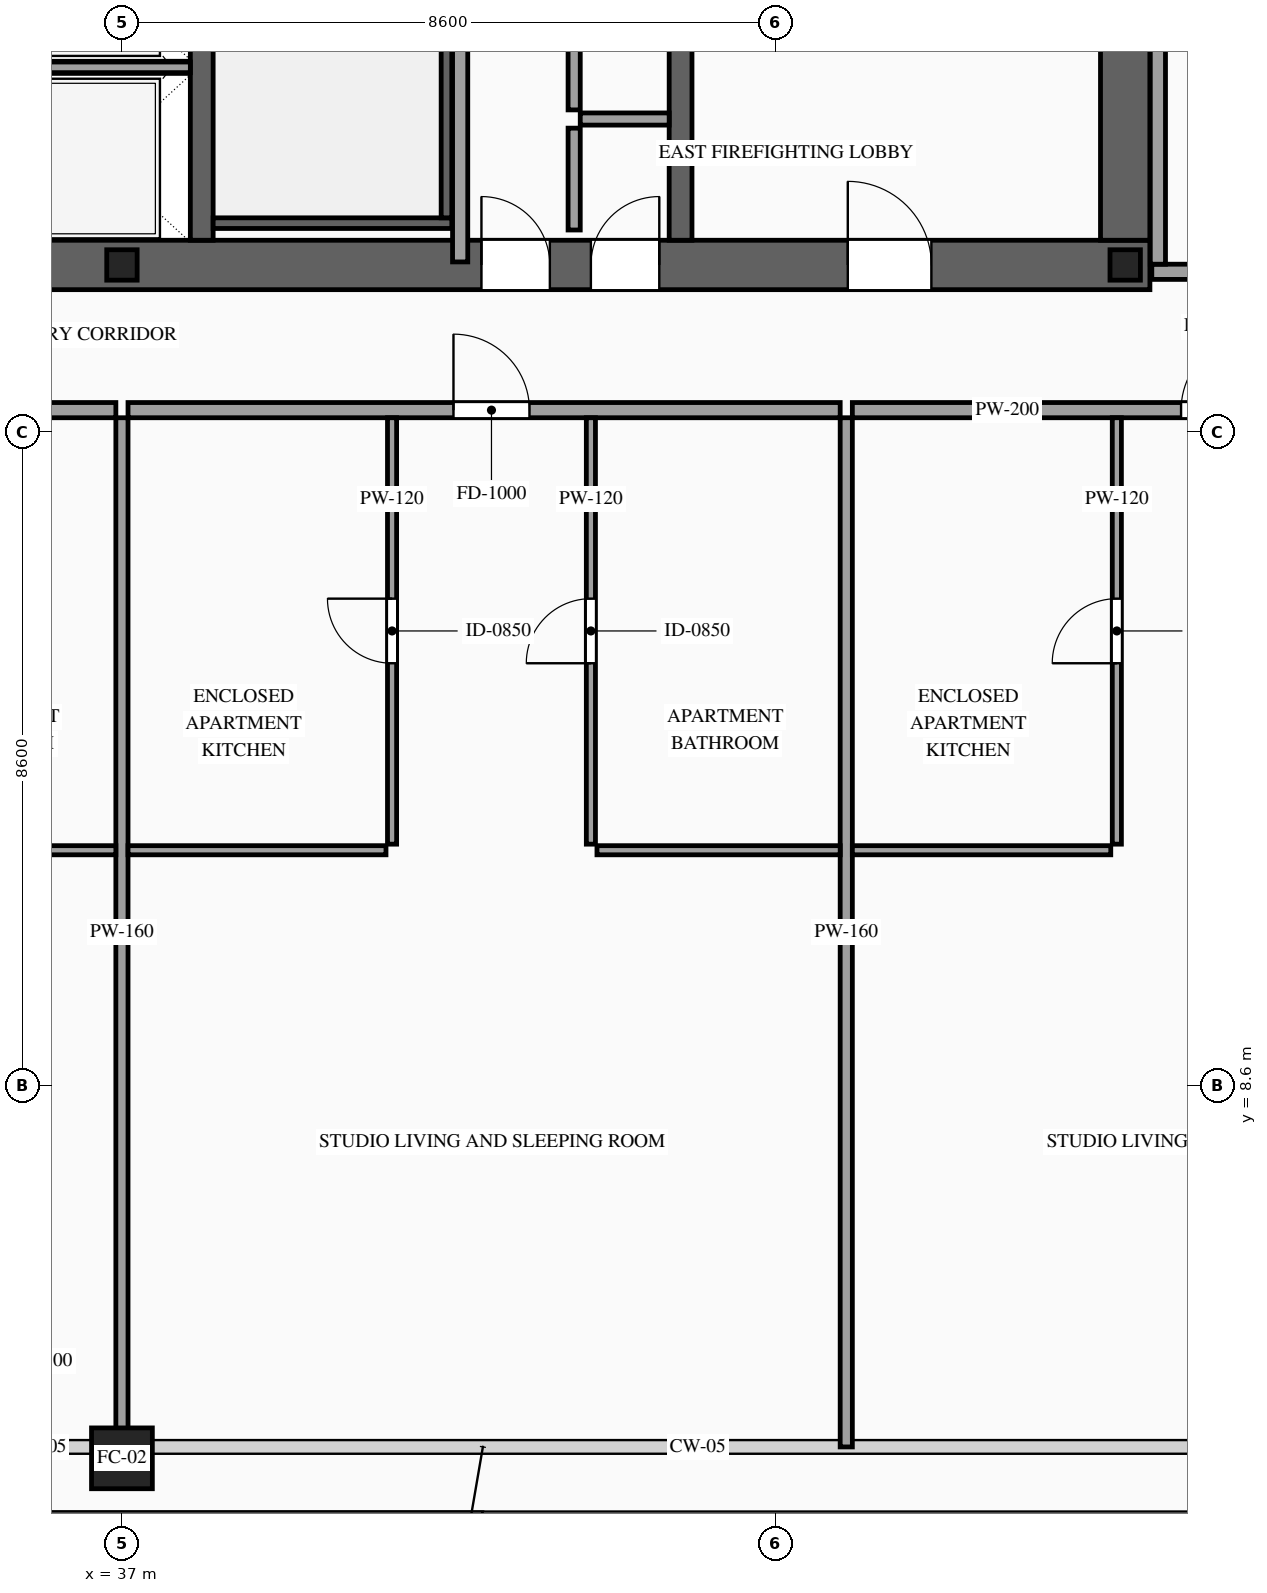
"""IFC4 building model, lengths in metres.
Left out: names, types, materials, properties, quantities, classifications, styles, units other than length and angle.
Written with IfcOpenShell. Run it as: python <this file> out.ifc"""

import sys

from ifc_helpers import new_model, si_unit, direction, frame, frame_2d, origin, origin_2d, place, context, subcontext, project, spatial, rectangle, hollow_rectangle, i_section, extrude, source, transform, mapped, element, fill, save


model = new_model("IFC4")
c1 = context("Model", 3, precision=1e-05, world=origin(), true_north=direction((0.0, 1.0)))
c2 = subcontext(c1, "Body", "Model", "MODEL_VIEW")
j1 = project(units=[si_unit("LENGTHUNIT", "METRE"), si_unit("PLANEANGLEUNIT", "RADIAN")], contexts=[c1])
p1 = place(None, origin())
s1 = spatial("IfcSite", under=j1, at=p1, CompositionType="ELEMENT")
p2 = place(p1, origin())
s2 = spatial("IfcBuilding", under=s1, at=p2, CompositionType="ELEMENT")
p3 = place(p2, frame((0.0, 0.0, 184.5)))
s3 = spatial("IfcBuildingStorey", under=s2, at=p3, CompositionType="ELEMENT", Elevation=184.5)
p4 = place(p3, frame((23.475, 19.4, 0.0), z_axis=(0.0, 0.0, 1.0), x_axis=(1.0, 0.0, 0.0)))
e1 = element("IfcWall", 1, at=p4, inside=s3, PredefinedType="SHEAR", context=c2, shape_type="SweptSolid", body=[
    extrude(rectangle(XDim=27.05, YDim=0.65, at=frame_2d((13.525, 0.0))), origin(), (0.0, 0.0, 1.0), 3.5),
])
p5 = place(p4, frame((1.975, 0.0, 0.0)))
e2 = element("IfcOpeningElement", 2, at=p5, cuts=e1, PredefinedType="OPENING", context=c2, shape_type="SweptSolid", body=[
    extrude(rectangle(XDim=1.1, YDim=2.2, at=frame_2d((0.55, 1.1))), frame((0.0, 0.34, 0.0), z_axis=(0.0, -1.0, 0.0), x_axis=(1.0, 0.0, 0.0)), (0.0, 0.0, 1.0), 0.68),
])
p6 = place(p4, frame((9.875, 0.0, 0.0)))
e3 = element("IfcOpeningElement", 3, at=p6, cuts=e1, PredefinedType="OPENING", context=c2, shape_type="SweptSolid", body=[
    extrude(rectangle(XDim=1.1, YDim=2.2, at=frame_2d((0.55, 1.1))), frame((0.0, 0.34, 0.0), z_axis=(0.0, -1.0, 0.0), x_axis=(1.0, 0.0, 0.0)), (0.0, 0.0, 1.0), 0.68),
])
p7 = place(p4, frame((23.075, 0.0, 0.0)))
e4 = element("IfcOpeningElement", 4, at=p7, cuts=e1, PredefinedType="OPENING", context=c2, shape_type="SweptSolid", body=[
    extrude(rectangle(XDim=1.1, YDim=2.2, at=frame_2d((0.55, 1.1))), frame((0.0, 0.34, 0.0), z_axis=(0.0, -1.0, 0.0), x_axis=(1.0, 0.0, 0.0)), (0.0, 0.0, 1.0), 0.68),
])
p8 = place(p4, frame((19.695, 0.0, 0.0)))
e5 = element("IfcOpeningElement", 5, at=p8, cuts=e1, PredefinedType="OPENING", context=c2, shape_type="SweptSolid", body=[
    extrude(rectangle(XDim=0.9, YDim=2.15, at=frame_2d((0.45, 1.075))), frame((0.0, 0.34, 0.0), z_axis=(0.0, -1.0, 0.0), x_axis=(1.0, 0.0, 0.0)), (0.0, 0.0, 1.0), 0.68),
])
p9 = place(p4, frame((18.255, 0.0, 0.0)))
e6 = element("IfcOpeningElement", 6, at=p9, cuts=e1, PredefinedType="OPENING", context=c2, shape_type="SweptSolid", body=[
    extrude(rectangle(XDim=0.9, YDim=2.15, at=frame_2d((0.45, 1.075))), frame((0.0, 0.34, 0.0), z_axis=(0.0, -1.0, 0.0), x_axis=(1.0, 0.0, 0.0)), (0.0, 0.0, 1.0), 0.68),
])
m1 = source(origin(), c2, "Body", "SweptSolid", [
    extrude(rectangle(XDim=12.15, YDim=0.65, at=frame_2d((6.075, 0.0))), origin(), (0.0, 0.0, 1.0), 3.5),
])
p10 = place(p3, frame((50.2, 19.725, 0.0), z_axis=(0.0, 0.0, 1.0), x_axis=(0.0, 1.0, 0.0)))
e7 = element("IfcWall", 7, at=p10, inside=s3, PredefinedType="SHEAR", context=c2, shape_type="MappedRepresentation", body=[
    mapped(m1, transform((0.0, 0.0, 0.0), scale=1.0)),
])
m2 = source(origin(), c2, "Body", "SweptSolid", [
    extrude(rectangle(XDim=12.15, YDim=0.3, at=frame_2d((6.075, 0.0))), origin(), (0.0, 0.0, 1.0), 3.5),
])
for number, where, z_axis, x_axis in (
    (8, (38.05, 19.725, 0.0), (0.0, 0.0, 1.0), (0.0, 1.0, 0.0)),
    (9, (44.35, 19.725, 0.0), (0.0, 0.0, 1.0), (0.0, 1.0, 0.0)),
):
    element("IfcWall", number, at=place(p3, frame(where, z_axis=z_axis, x_axis=x_axis)), inside=s3, PredefinedType="SOLIDWALL", context=c2, shape_type="MappedRepresentation", body=[
        mapped(m2, transform((0.0, 0.0, 0.0), scale=1.0)),
    ])
m3 = source(origin(), c2, "Body", "SweptSolid", [
    extrude(i_section(OverallWidth=0.4, OverallDepth=0.4, WebThickness=0.013, FlangeThickness=0.021, at=origin_2d()), origin(), (0.0, 0.0, 1.0), 3.5),
])
for number, where, z_axis, x_axis in (
    (10, (37.0, 19.4, 0.0), (0.0, 0.0, 1.0), (1.0, 0.0, 0.0)),
    (11, (50.2, 19.4, 0.0), (0.0, 0.0, 1.0), (1.0, 0.0, 0.0)),
):
    element("IfcColumn", number, at=place(p3, frame(where, z_axis=z_axis, x_axis=x_axis)), inside=s3, PredefinedType="COLUMN", context=c2, shape_type="MappedRepresentation", body=[
        mapped(m3, transform((0.0, 0.0, 0.0), scale=1.0)),
    ])
m4 = source(origin(), c2, "Body", "SweptSolid", [
    extrude(hollow_rectangle(XDim=0.8, YDim=0.8, WallThickness=0.036, at=origin_2d()), origin(), (0.0, 0.0, 1.0), 3.5),
])
p11 = place(p3, frame((37.0, 3.7, 0.0), z_axis=(0.0, 0.0, 1.0), x_axis=(1.0, 0.0, 0.0)))
e12 = element("IfcColumn", 12, at=p11, inside=s3, PredefinedType="COLUMN", context=c2, shape_type="MappedRepresentation", body=[
    mapped(m4, transform((0.0, 0.0, 0.0), scale=1.0)),
])
m5 = source(origin(), c2, "Body", "SweptSolid", [
    extrude(rectangle(XDim=2.4, YDim=0.14, at=frame_2d((1.2, 0.0))), origin(), (0.0, 0.0, 1.0), 3.28),
])
p12 = place(p3, frame((35.5, 22.0, 0.0), z_axis=(0.0, 0.0, 1.0), x_axis=(1.0, 0.0, 0.0)))
e13 = element("IfcWall", 13, at=p12, inside=s3, PredefinedType="SOLIDWALL", context=c2, shape_type="MappedRepresentation", body=[
    mapped(m5, transform((0.0, 0.0, 0.0), scale=1.0)),
])
m6 = source(origin(), c2, "Body", "SweptSolid", [
    extrude(rectangle(XDim=3.14, YDim=0.14, at=frame_2d((1.57, 0.0))), origin(), (0.0, 0.0, 1.0), 3.28),
])
p13 = place(p3, frame((38.2, 19.95, 0.0), z_axis=(0.0, 0.0, 1.0), x_axis=(1.0, 0.0, 0.0)))
e14 = element("IfcWall", 14, at=p13, inside=s3, PredefinedType="SOLIDWALL", context=c2, shape_type="MappedRepresentation", body=[
    mapped(m6, transform((0.0, 0.0, 0.0), scale=1.0)),
])
m7 = source(origin(), c2, "Body", "SweptSolid", [
    extrude(rectangle(XDim=8.94, YDim=0.14, at=frame_2d((4.47, 0.0))), origin(), (0.0, 0.0, 1.0), 3.28),
])
p14 = place(p3, frame((41.27, 20.02, 0.0), z_axis=(0.0, 0.0, 1.0), x_axis=(0.0, 1.0, 0.0)))
e15 = element("IfcWall", 15, at=p14, inside=s3, PredefinedType="SOLIDWALL", context=c2, shape_type="MappedRepresentation", body=[
    mapped(m7, transform((0.0, 0.0, 0.0), scale=1.0)),
])
m8 = source(origin(), c2, "Body", "SweptSolid", [
    extrude(rectangle(XDim=1.34, YDim=0.16, at=frame_2d((0.67, 0.0))), origin(), (0.0, 0.0, 1.0), 3.28),
])
p15 = place(p3, frame((42.95, 19.86, 0.0), z_axis=(0.0, 0.0, 1.0), x_axis=(0.0, 1.0, 0.0)))
e16 = element("IfcWall", 16, at=p15, inside=s3, PredefinedType="PARTITIONING", context=c2, shape_type="MappedRepresentation", body=[
    mapped(m8, transform((0.0, 0.0, 0.0), scale=1.0)),
])
m9 = source(origin(), c2, "Body", "SweptSolid", [
    extrude(rectangle(XDim=1.17, YDim=0.16, at=frame_2d((0.585, 0.0))), origin(), (0.0, 0.0, 1.0), 3.28),
])
p16 = place(p3, frame((43.03, 21.32, 0.0), z_axis=(0.0, 0.0, 1.0), x_axis=(1.0, 0.0, 0.0)))
e17 = element("IfcWall", 17, at=p16, inside=s3, PredefinedType="PARTITIONING", context=c2, shape_type="MappedRepresentation", body=[
    mapped(m9, transform((0.0, 0.0, 0.0), scale=1.0)),
])
m10 = source(origin(), c2, "Body", "SweptSolid", [
    extrude(rectangle(XDim=12.72, YDim=0.2, at=frame_2d((6.36, 0.0))), origin(), (0.0, 0.0, 1.0), 3.28),
])
p17 = place(p3, frame((41.45, 19.44, 0.0), z_axis=(0.0, 0.0, 1.0), x_axis=(0.0, 1.0, 0.0)))
e18 = element("IfcWall", 18, at=p17, inside=s3, PredefinedType="PARTITIONING", context=c2, shape_type="MappedRepresentation", body=[
    mapped(m10, transform((0.0, 0.0, 0.0), scale=1.0)),
])
m11 = source(origin(), c2, "Body", "SweptSolid", [
    extrude(rectangle(XDim=10.72, YDim=0.16, at=frame_2d((5.36, 0.0))), origin(), (0.0, 0.0, 1.0), 3.28),
])
p18 = place(p3, frame((42.95, 21.44, 0.0), z_axis=(0.0, 0.0, 1.0), x_axis=(0.0, 1.0, 0.0)))
e19 = element("IfcWall", 19, at=p18, inside=s3, PredefinedType="PARTITIONING", context=c2, shape_type="MappedRepresentation", body=[
    mapped(m11, transform((0.0, 0.0, 0.0), scale=1.0)),
])
p19 = place(p3, frame((27.55, 17.49, 0.0), z_axis=(0.0, 0.0, 1.0), x_axis=(1.0, 0.0, 0.0)))
e20 = element("IfcWall", 20, at=p19, inside=s3, PredefinedType="PARTITIONING", context=c2, shape_type="SweptSolid", body=[
    extrude(rectangle(XDim=9.37, YDim=0.2, at=frame_2d((4.685, 0.0))), origin(), (0.0, 0.0, 1.0), 3.28),
])
p20 = place(p19, frame((4.282, 0.0, 0.0)))
e21 = element("IfcOpeningElement", 21, at=p20, cuts=e20, PredefinedType="OPENING", context=c2, shape_type="SweptSolid", body=[
    extrude(rectangle(XDim=1.0, YDim=2.2, at=frame_2d((0.5, 1.1))), frame((0.0, 0.115, 0.0), z_axis=(0.0, -1.0, 0.0), x_axis=(1.0, 0.0, 0.0)), (0.0, 0.0, 1.0), 0.23),
])
m12 = source(origin(), c2, "Body", "SweptSolid", [
    extrude(rectangle(XDim=13.54, YDim=0.16, at=frame_2d((6.77, 0.0))), origin(), (0.0, 0.0, 1.0), 2.687),
])
p21 = place(p3, frame((37.0, 3.85, 0.0), z_axis=(0.0, 0.0, 1.0), x_axis=(0.0, 1.0, 0.0)))
e22 = element("IfcWall", 22, at=p21, inside=s3, PredefinedType="PARTITIONING", context=c2, shape_type="MappedRepresentation", body=[
    mapped(m12, transform((0.0, 0.0, 0.0), scale=1.0)),
])
m13 = source(origin(), c2, "Body", "SweptSolid", [
    extrude(rectangle(XDim=3.2, YDim=0.12, at=frame_2d((1.6, 0.0))), origin(), (0.0, 0.0, 1.0), 2.875),
])
p22 = place(p3, frame((33.72, 11.7, 0.0), z_axis=(0.0, 0.0, 1.0), x_axis=(1.0, 0.0, 0.0)))
e23 = element("IfcWall", 23, at=p22, inside=s3, PredefinedType="PARTITIONING", context=c2, shape_type="MappedRepresentation", body=[
    mapped(m13, transform((0.0, 0.0, 0.0), scale=1.0)),
])
p23 = place(p3, frame((37.08, 17.49, 0.0), z_axis=(0.0, 0.0, 1.0), x_axis=(1.0, 0.0, 0.0)))
e24 = element("IfcWall", 24, at=p23, inside=s3, PredefinedType="PARTITIONING", context=c2, shape_type="SweptSolid", body=[
    extrude(rectangle(XDim=9.37, YDim=0.2, at=frame_2d((4.685, 0.0))), origin(), (0.0, 0.0, 1.0), 3.28),
])
p24 = place(p23, frame((4.282, 0.0, 0.0)))
e25 = element("IfcOpeningElement", 25, at=p24, cuts=e24, PredefinedType="OPENING", context=c2, shape_type="SweptSolid", body=[
    extrude(rectangle(XDim=1.0, YDim=2.2, at=frame_2d((0.5, 1.1))), frame((0.0, 0.115, 0.0), z_axis=(0.0, -1.0, 0.0), x_axis=(1.0, 0.0, 0.0)), (0.0, 0.0, 1.0), 0.23),
])
m14 = source(origin(), c2, "Body", "SweptSolid", [
    extrude(rectangle(XDim=13.54, YDim=0.16, at=frame_2d((6.77, 0.0))), origin(), (0.0, 0.0, 1.0), 3.28),
])
p25 = place(p3, frame((46.53, 3.85, 0.0), z_axis=(0.0, 0.0, 1.0), x_axis=(0.0, 1.0, 0.0)))
e26 = element("IfcWall", 26, at=p25, inside=s3, PredefinedType="PARTITIONING", context=c2, shape_type="MappedRepresentation", body=[
    mapped(m14, transform((0.0, 0.0, 0.0), scale=1.0)),
])
m15 = source(origin(), c2, "Body", "SweptSolid", [
    extrude(rectangle(XDim=3.394, YDim=0.12, at=frame_2d((1.697, 0.0))), origin(), (0.0, 0.0, 1.0), 2.875),
])
p26 = place(p3, frame((37.08, 11.7, 0.0), z_axis=(0.0, 0.0, 1.0), x_axis=(1.0, 0.0, 0.0)))
e27 = element("IfcWall", 27, at=p26, inside=s3, PredefinedType="PARTITIONING", context=c2, shape_type="MappedRepresentation", body=[
    mapped(m15, transform((0.0, 0.0, 0.0), scale=1.0)),
])
p27 = place(p3, frame((40.554, 11.78, 0.0), z_axis=(0.0, 0.0, 1.0), x_axis=(0.0, 1.0, 0.0)))
e28 = element("IfcWall", 28, at=p27, inside=s3, PredefinedType="PARTITIONING", context=c2, shape_type="SweptSolid", body=[
    extrude(rectangle(XDim=5.61, YDim=0.12, at=frame_2d((2.805, 0.0))), origin(), (0.0, 0.0, 1.0), 3.28),
])
p28 = place(p27, frame((2.38, 0.0, 0.0)))
e29 = element("IfcOpeningElement", 29, at=p28, cuts=e28, PredefinedType="OPENING", context=c2, shape_type="SweptSolid", body=[
    extrude(rectangle(XDim=0.85, YDim=2.1, at=frame_2d((0.425, 1.05))), frame((0.0, 0.075, 0.0), z_axis=(0.0, -1.0, 0.0), x_axis=(1.0, 0.0, 0.0)), (0.0, 0.0, 1.0), 0.15),
])
p29 = place(p3, frame((43.25, 11.7, 0.0), z_axis=(0.0, 0.0, 1.0), x_axis=(1.0, 0.0, 0.0)))
e30 = element("IfcWall", 30, at=p29, inside=s3, PredefinedType="PARTITIONING", context=c2, shape_type="MappedRepresentation", body=[
    mapped(m13, transform((0.0, 0.0, 0.0), scale=1.0)),
])
p30 = place(p3, frame((43.17, 11.78, 0.0), z_axis=(0.0, 0.0, 1.0), x_axis=(0.0, 1.0, 0.0)))
e31 = element("IfcWall", 31, at=p30, inside=s3, PredefinedType="PARTITIONING", context=c2, shape_type="SweptSolid", body=[
    extrude(rectangle(XDim=5.61, YDim=0.12, at=frame_2d((2.805, 0.0))), origin(), (0.0, 0.0, 1.0), 3.28),
])
p31 = place(p30, frame((2.38, 0.0, 0.0)))
e32 = element("IfcOpeningElement", 32, at=p31, cuts=e31, PredefinedType="OPENING", context=c2, shape_type="SweptSolid", body=[
    extrude(rectangle(XDim=0.85, YDim=2.1, at=frame_2d((0.425, 1.05))), frame((0.0, 0.075, 0.0), z_axis=(0.0, -1.0, 0.0), x_axis=(1.0, 0.0, 0.0)), (0.0, 0.0, 1.0), 0.15),
])
p32 = place(p3, frame((46.61, 17.49, 0.0), z_axis=(0.0, 0.0, 1.0), x_axis=(1.0, 0.0, 0.0)))
e33 = element("IfcWall", 33, at=p32, inside=s3, PredefinedType="PARTITIONING", context=c2, shape_type="SweptSolid", body=[
    extrude(rectangle(XDim=9.45, YDim=0.2, at=frame_2d((4.725, 0.0))), origin(), (0.0, 0.0, 1.0), 3.28),
])
p33 = place(p32, frame((4.325, 0.0, 0.0)))
e34 = element("IfcOpeningElement", 34, at=p33, cuts=e33, PredefinedType="OPENING", context=c2, shape_type="SweptSolid", body=[
    extrude(rectangle(XDim=1.0, YDim=2.2, at=frame_2d((0.5, 1.1))), frame((0.0, 0.115, 0.0), z_axis=(0.0, -1.0, 0.0), x_axis=(1.0, 0.0, 0.0)), (0.0, 0.0, 1.0), 0.23),
])
m16 = source(origin(), c2, "Body", "SweptSolid", [
    extrude(rectangle(XDim=3.4, YDim=0.12, at=frame_2d((1.7, 0.0))), origin(), (0.0, 0.0, 1.0), 2.875),
])
p34 = place(p3, frame((46.61, 11.7, 0.0), z_axis=(0.0, 0.0, 1.0), x_axis=(1.0, 0.0, 0.0)))
e35 = element("IfcWall", 35, at=p34, inside=s3, PredefinedType="PARTITIONING", context=c2, shape_type="MappedRepresentation", body=[
    mapped(m16, transform((0.0, 0.0, 0.0), scale=1.0)),
])
p35 = place(p3, frame((50.09, 11.78, 0.0), z_axis=(0.0, 0.0, 1.0), x_axis=(0.0, 1.0, 0.0)))
e36 = element("IfcWall", 36, at=p35, inside=s3, PredefinedType="PARTITIONING", context=c2, shape_type="SweptSolid", body=[
    extrude(rectangle(XDim=5.61, YDim=0.12, at=frame_2d((2.805, 0.0))), origin(), (0.0, 0.0, 1.0), 2.775),
])
p36 = place(p35, frame((2.38, 0.0, 0.0)))
e37 = element("IfcOpeningElement", 37, at=p36, cuts=e36, PredefinedType="OPENING", context=c2, shape_type="SweptSolid", body=[
    extrude(rectangle(XDim=0.85, YDim=2.1, at=frame_2d((0.425, 1.05))), frame((0.0, 0.075, 0.0), z_axis=(0.0, -1.0, 0.0), x_axis=(1.0, 0.0, 0.0)), (0.0, 0.0, 1.0), 0.15),
])
m17 = source(origin(), c2, "Body", "SweptSolid", [
    extrude(rectangle(XDim=8.4, YDim=0.2, at=frame_2d((4.2, 0.0))), origin(), (0.0, 0.0, 1.0), 2.775),
])
p37 = place(p3, frame((50.55, 19.31, 0.0), z_axis=(0.0, 0.0, 1.0), x_axis=(1.0, 0.0, 0.0)))
e38 = element("IfcWall", 38, at=p37, inside=s3, PredefinedType="PARTITIONING", context=c2, shape_type="MappedRepresentation", body=[
    mapped(m17, transform((0.0, 0.0, 0.0), scale=1.0)),
])
m18 = source(origin(), c2, "Body", "SweptSolid", [
    extrude(rectangle(XDim=12.78, YDim=0.2, at=frame_2d((6.39, 0.0))), origin(), (0.0, 0.0, 1.0), 3.28),
])
p38 = place(p3, frame((50.63, 19.41, 0.0), z_axis=(0.0, 0.0, 1.0), x_axis=(0.0, 1.0, 0.0)))
e39 = element("IfcWall", 39, at=p38, inside=s3, PredefinedType="PARTITIONING", context=c2, shape_type="MappedRepresentation", body=[
    mapped(m18, transform((0.0, 0.0, 0.0), scale=1.0)),
])
m19 = source(origin(), c2, "Body", "SweptSolid", [
    extrude(rectangle(XDim=1.1, YDim=2.2, at=frame_2d((0.55, 1.1))), frame((0.0, 0.025, 0.0), z_axis=(0.0, -1.0, 0.0), x_axis=(1.0, 0.0, 0.0)), (0.0, 0.0, 1.0), 0.05),
])
p39 = place(p7, origin())
e40 = element("IfcDoor", 40, at=p39, inside=s3, OperationType="SINGLE_SWING_LEFT", PredefinedType="DOOR", context=c2, shape_type="MappedRepresentation", body=[
    mapped(m19, transform((0.0, 0.0, 0.0), scale=1.0)),
])
fill(e4, e40)
m20 = source(origin(), c2, "Body", "SweptSolid", [
    extrude(rectangle(XDim=0.9, YDim=2.15, at=frame_2d((0.45, 1.075))), frame((0.0, 0.025, 0.0), z_axis=(0.0, -1.0, 0.0), x_axis=(1.0, 0.0, 0.0)), (0.0, 0.0, 1.0), 0.05),
])
p40 = place(p8, origin())
e41 = element("IfcDoor", 41, at=p40, inside=s3, OperationType="SINGLE_SWING_RIGHT", PredefinedType="DOOR", context=c2, shape_type="MappedRepresentation", body=[
    mapped(m20, transform((0.0, 0.0, 0.0), scale=1.0)),
])
fill(e5, e41)
p41 = place(p9, origin())
e42 = element("IfcDoor", 42, at=p41, inside=s3, OperationType="SINGLE_SWING_LEFT", PredefinedType="DOOR", context=c2, shape_type="MappedRepresentation", body=[
    mapped(m20, transform((0.0, 0.0, 0.0), scale=1.0)),
])
fill(e6, e42)
m21 = source(origin(), c2, "Body", "SweptSolid", [
    extrude(rectangle(XDim=1.0, YDim=2.2, at=frame_2d((0.5, 1.1))), frame((0.0, 0.025, 0.0), z_axis=(0.0, -1.0, 0.0), x_axis=(1.0, 0.0, 0.0)), (0.0, 0.0, 1.0), 0.05),
])
p42 = place(p24, origin())
e43 = element("IfcDoor", 43, at=p42, inside=s3, OperationType="SINGLE_SWING_LEFT", PredefinedType="DOOR", context=c2, shape_type="MappedRepresentation", body=[
    mapped(m21, transform((0.0, 0.0, 0.0), scale=1.0)),
])
fill(e25, e43)
m22 = source(origin(), c2, "Body", "SweptSolid", [
    extrude(rectangle(XDim=0.85, YDim=2.1, at=frame_2d((0.425, 1.05))), frame((0.0, 0.025, 0.0), z_axis=(0.0, -1.0, 0.0), x_axis=(1.0, 0.0, 0.0)), (0.0, 0.0, 1.0), 0.05),
])
p43 = place(p28, origin())
e44 = element("IfcDoor", 44, at=p43, inside=s3, OperationType="SINGLE_SWING_RIGHT", PredefinedType="DOOR", context=c2, shape_type="MappedRepresentation", body=[
    mapped(m22, transform((0.0, 0.0, 0.0), scale=1.0)),
])
fill(e29, e44)
p44 = place(p31, origin())
e45 = element("IfcDoor", 45, at=p44, inside=s3, OperationType="SINGLE_SWING_LEFT", PredefinedType="DOOR", context=c2, shape_type="MappedRepresentation", body=[
    mapped(m22, transform((0.0, 0.0, 0.0), scale=1.0)),
])
fill(e32, e45)
p45 = place(p33, origin())
e46 = element("IfcDoor", 46, at=p45, inside=s3, OperationType="SINGLE_SWING_RIGHT", PredefinedType="DOOR", context=c2, shape_type="MappedRepresentation", body=[
    mapped(m21, transform((0.0, 0.0, 0.0), scale=1.0)),
])
fill(e34, e46)
p46 = place(p36, origin())
e47 = element("IfcDoor", 47, at=p46, inside=s3, OperationType="SINGLE_SWING_LEFT", PredefinedType="DOOR", context=c2, shape_type="MappedRepresentation", body=[
    mapped(m22, transform((0.0, 0.0, 0.0), scale=1.0)),
])
fill(e37, e47)
save(model, sys.argv[1])
